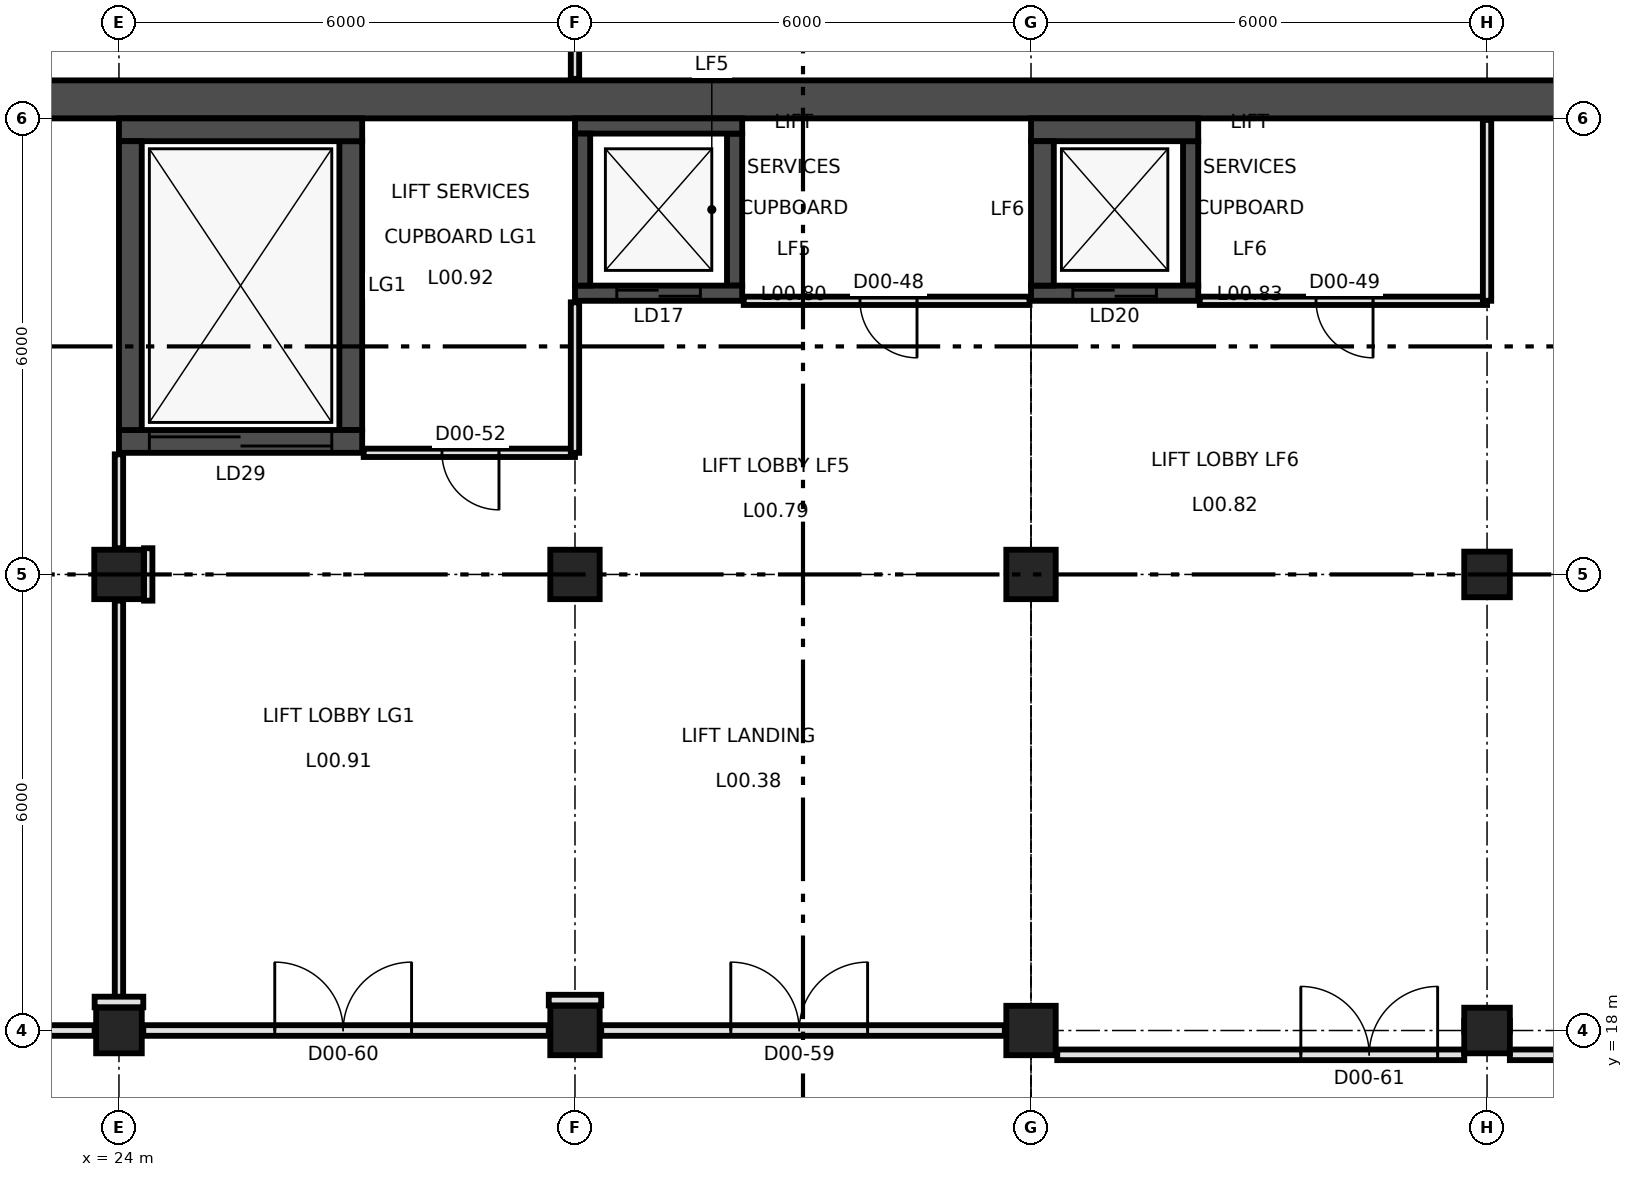
"""IFC4 building model, lengths in metres.
Left out: names, types, materials, properties, quantities, classifications, styles, units other than length and angle.
Written with IfcOpenShell. Run it as: python <this file> out.ifc"""

import sys

from ifc_helpers import new_model, si_unit, direction, frame, frame_2d, origin, origin_2d, place, context, subcontext, project, spatial, rectangle, extrude, element, fill, save


model = new_model("IFC4")
c1 = context("Model", 3, precision=1e-05, world=origin(), true_north=direction((0.0, 1.0)))
c2 = subcontext(c1, "Body", "Model", "MODEL_VIEW")
j1 = project(units=[si_unit("LENGTHUNIT", "METRE"), si_unit("PLANEANGLEUNIT", "RADIAN")], contexts=[c1])
p1 = place(None, origin())
s1 = spatial("IfcSite", under=j1, at=p1, CompositionType="ELEMENT")
p2 = place(p1, origin())
s2 = spatial("IfcBuilding", under=s1, at=p2, CompositionType="ELEMENT")
p3 = place(p2, origin())
s3 = spatial("IfcBuildingStorey", under=s2, at=p3, CompositionType="ELEMENT", Elevation=0.0)
p4 = place(p3, frame((24.0, 18.0, -0.3), z_axis=(0.0, 0.0, 1.0), x_axis=(1.0, 0.0, 0.0)))
e1 = element("IfcColumn", 1, at=p4, inside=s3, PredefinedType="COLUMN", context=c2, shape_type="SweptSolid", body=[
    extrude(rectangle(XDim=0.6, YDim=0.6, at=origin_2d()), origin(), (0.0, 0.0, 1.0), 7.3),
])
for number, where, z_axis, x_axis in (
    (2, (30.0, 18.0, -0.3), (0.0, 0.0, 1.0), (1.0, 0.0, 0.0)),
    (3, (36.0, 18.0, -0.3), (0.0, 0.0, 1.0), (1.0, 0.0, 0.0)),
):
    element("IfcColumn", number, at=place(p3, frame(where, z_axis=z_axis, x_axis=x_axis)), inside=s3, PredefinedType="COLUMN", context=c2, shape_type="SweptSolid", body=[
        extrude(rectangle(XDim=0.65, YDim=0.65, at=origin_2d()), origin(), (0.0, 0.0, 1.0), 7.3),
    ])
p5 = place(p3, frame((42.0, 18.0, -0.3), z_axis=(0.0, 0.0, 1.0), x_axis=(1.0, 0.0, 0.0)))
e4 = element("IfcColumn", 4, at=p5, inside=s3, PredefinedType="COLUMN", context=c2, shape_type="SweptSolid", body=[
    extrude(rectangle(XDim=0.6, YDim=0.6, at=origin_2d()), origin(), (0.0, 0.0, 1.0), 7.3),
])
for number, where, z_axis, x_axis in (
    (5, (24.0, 24.0, -0.3), (0.0, 0.0, 1.0), (1.0, 0.0, 0.0)),
    (6, (30.0, 24.0, -0.3), (0.0, 0.0, 1.0), (1.0, 0.0, 0.0)),
    (7, (36.0, 24.0, -0.3), (0.0, 0.0, 1.0), (1.0, 0.0, 0.0)),
):
    element("IfcColumn", number, at=place(p3, frame(where, z_axis=z_axis, x_axis=x_axis)), inside=s3, PredefinedType="COLUMN", context=c2, shape_type="SweptSolid", body=[
        extrude(rectangle(XDim=0.65, YDim=0.65, at=origin_2d()), origin(), (0.0, 0.0, 1.0), 7.3),
    ])
p6 = place(p3, frame((42.0, 24.0, -0.3), z_axis=(0.0, 0.0, 1.0), x_axis=(1.0, 0.0, 0.0)))
e8 = element("IfcColumn", 8, at=p6, inside=s3, PredefinedType="COLUMN", context=c2, shape_type="SweptSolid", body=[
    extrude(rectangle(XDim=0.6, YDim=0.6, at=origin_2d()), origin(), (0.0, 0.0, 1.0), 7.3),
])
p7 = place(p3, frame((30.0, 29.9, -1.4), z_axis=(0.0, 0.0, 1.0), x_axis=(1.0, 0.0, 0.0)))
e9 = element("IfcWall", 9, at=p7, inside=s3, PredefinedType="SHEAR", context=c2, shape_type="SweptSolid", body=[
    extrude(rectangle(XDim=2.2, YDim=0.2, at=frame_2d((1.1, 0.0))), origin(), (0.0, 0.0, 1.0), 8.4),
])
p8 = place(p3, frame((30.0, 27.7, -1.4), z_axis=(0.0, 0.0, 1.0), x_axis=(1.0, 0.0, 0.0)))
e10 = element("IfcWall", 10, at=p8, inside=s3, PredefinedType="SHEAR", context=c2, shape_type="SweptSolid", body=[
    extrude(rectangle(XDim=2.2, YDim=0.2, at=frame_2d((1.1, 0.0))), origin(), (0.0, 0.0, 1.0), 8.4),
])
p9 = place(p8, frame((0.55, 0.0, 1.4)))
e11 = element("IfcOpeningElement", 11, at=p9, cuts=e10, PredefinedType="OPENING", context=c2, shape_type="SweptSolid", body=[
    extrude(rectangle(XDim=1.1, YDim=2.1, at=frame_2d((0.55, 1.05))), frame((0.0, 0.11, 0.0), z_axis=(0.0, -1.0, 0.0), x_axis=(1.0, 0.0, 0.0)), (0.0, 0.0, 1.0), 0.22),
])
for number, where, z_axis, x_axis in (
    (12, (30.1, 27.8, -1.4), (0.0, 0.0, 1.0), (0.0, 1.0, 0.0)),
    (13, (32.1, 27.8, -1.4), (0.0, 0.0, 1.0), (0.0, 1.0, 0.0)),
):
    element("IfcWall", number, at=place(p3, frame(where, z_axis=z_axis, x_axis=x_axis)), inside=s3, PredefinedType="SHEAR", context=c2, shape_type="SweptSolid", body=[
        extrude(rectangle(XDim=2.0, YDim=0.2, at=frame_2d((1.0, 0.0))), origin(), (0.0, 0.0, 1.0), 8.4),
    ])
p10 = place(p3, frame((36.0, 29.85, -1.4), z_axis=(0.0, 0.0, 1.0), x_axis=(1.0, 0.0, 0.0)))
e14 = element("IfcWall", 14, at=p10, inside=s3, PredefinedType="SHEAR", context=c2, shape_type="SweptSolid", body=[
    extrude(rectangle(XDim=2.2, YDim=0.3, at=frame_2d((1.1, 0.0))), origin(), (0.0, 0.0, 1.0), 8.4),
])
p11 = place(p3, frame((36.0, 27.7, -1.4), z_axis=(0.0, 0.0, 1.0), x_axis=(1.0, 0.0, 0.0)))
e15 = element("IfcWall", 15, at=p11, inside=s3, PredefinedType="SHEAR", context=c2, shape_type="SweptSolid", body=[
    extrude(rectangle(XDim=2.2, YDim=0.2, at=frame_2d((1.1, 0.0))), origin(), (0.0, 0.0, 1.0), 8.4),
])
p12 = place(p11, frame((0.55, 0.0, 1.4)))
e16 = element("IfcOpeningElement", 16, at=p12, cuts=e15, PredefinedType="OPENING", context=c2, shape_type="SweptSolid", body=[
    extrude(rectangle(XDim=1.1, YDim=2.1, at=frame_2d((0.55, 1.05))), frame((0.0, 0.11, 0.0), z_axis=(0.0, -1.0, 0.0), x_axis=(1.0, 0.0, 0.0)), (0.0, 0.0, 1.0), 0.22),
])
p13 = place(p3, frame((36.15, 27.8, -1.4), z_axis=(0.0, 0.0, 1.0), x_axis=(0.0, 1.0, 0.0)))
e17 = element("IfcWall", 17, at=p13, inside=s3, PredefinedType="SHEAR", context=c2, shape_type="SweptSolid", body=[
    extrude(rectangle(XDim=1.9, YDim=0.3, at=frame_2d((0.95, 0.0))), origin(), (0.0, 0.0, 1.0), 8.4),
])
p14 = place(p3, frame((38.1, 27.8, -1.4), z_axis=(0.0, 0.0, 1.0), x_axis=(0.0, 1.0, 0.0)))
e18 = element("IfcWall", 18, at=p14, inside=s3, PredefinedType="SHEAR", context=c2, shape_type="SweptSolid", body=[
    extrude(rectangle(XDim=1.9, YDim=0.2, at=frame_2d((0.95, 0.0))), origin(), (0.0, 0.0, 1.0), 8.4),
])
p15 = place(p3, frame((24.0, 29.85, -1.4), z_axis=(0.0, 0.0, 1.0), x_axis=(1.0, 0.0, 0.0)))
e19 = element("IfcWall", 19, at=p15, inside=s3, PredefinedType="SHEAR", context=c2, shape_type="SweptSolid", body=[
    extrude(rectangle(XDim=3.2, YDim=0.3, at=frame_2d((1.6, 0.0))), origin(), (0.0, 0.0, 1.0), 8.4),
])
p16 = place(p3, frame((24.0, 25.75, -1.4), z_axis=(0.0, 0.0, 1.0), x_axis=(1.0, 0.0, 0.0)))
e20 = element("IfcWall", 20, at=p16, inside=s3, PredefinedType="SHEAR", context=c2, shape_type="SweptSolid", body=[
    extrude(rectangle(XDim=3.2, YDim=0.3, at=frame_2d((1.6, 0.0))), origin(), (0.0, 0.0, 1.0), 8.4),
])
p17 = place(p16, frame((0.4, 0.0, 1.4)))
e21 = element("IfcOpeningElement", 21, at=p17, cuts=e20, PredefinedType="OPENING", context=c2, shape_type="SweptSolid", body=[
    extrude(rectangle(XDim=2.4, YDim=2.4, at=frame_2d((1.2, 1.2))), frame((0.0, 0.16, 0.0), z_axis=(0.0, -1.0, 0.0), x_axis=(1.0, 0.0, 0.0)), (0.0, 0.0, 1.0), 0.32),
])
for number, where, z_axis, x_axis in (
    (22, (24.15, 25.9, -1.4), (0.0, 0.0, 1.0), (0.0, 1.0, 0.0)),
    (23, (27.05, 25.9, -1.4), (0.0, 0.0, 1.0), (0.0, 1.0, 0.0)),
):
    element("IfcWall", number, at=place(p3, frame(where, z_axis=z_axis, x_axis=x_axis)), inside=s3, PredefinedType="SHEAR", context=c2, shape_type="SweptSolid", body=[
        extrude(rectangle(XDim=3.8, YDim=0.3, at=frame_2d((1.9, 0.0))), origin(), (0.0, 0.0, 1.0), 8.4),
    ])
p18 = place(p3, frame((18.5, 30.25, -0.3), z_axis=(0.0, 0.0, 1.0), x_axis=(1.0, 0.0, 0.0)))
e24 = element("IfcWall", 24, at=p18, inside=s3, PredefinedType="SHEAR", context=c2, shape_type="SweptSolid", body=[
    extrude(rectangle(XDim=29.0, YDim=0.5, at=frame_2d((14.5, 0.0))), origin(), (0.0, 0.0, 1.0), 7.3),
])
p19 = place(p3, frame((30.0, 30.52, 0.0), z_axis=(0.0, 0.0, 1.0), x_axis=(0.0, 1.0, 0.0)))
e25 = element("IfcWall", 25, at=p19, inside=s3, PredefinedType="PARTITIONING", context=c2, shape_type="SweptSolid", body=[
    extrude(rectangle(XDim=3.11, YDim=0.11, at=frame_2d((1.555, 0.0))), origin(), (0.0, 0.0, 1.0), 6.7),
])
p20 = place(p3, frame((24.0, 24.345, 0.0), z_axis=(0.0, 0.0, 1.0), x_axis=(0.0, 1.0, 0.0)))
e26 = element("IfcWall", 26, at=p20, inside=s3, PredefinedType="PARTITIONING", context=c2, shape_type="SweptSolid", body=[
    extrude(rectangle(XDim=1.235, YDim=0.11, at=frame_2d((0.618, 0.0))), origin(), (0.0, 0.0, 1.0), 6.05),
])
p21 = place(p3, frame((24.0, 18.32, 0.0), z_axis=(0.0, 0.0, 1.0), x_axis=(0.0, 1.0, 0.0)))
e27 = element("IfcWall", 27, at=p21, inside=s3, PredefinedType="PARTITIONING", context=c2, shape_type="SweptSolid", body=[
    extrude(rectangle(XDim=5.335, YDim=0.11, at=frame_2d((2.667, 0.0))), origin(), (0.0, 0.0, 1.0), 6.05),
])
p22 = place(p3, frame((24.385, 23.655, 0.0), z_axis=(0.0, 0.0, 1.0), x_axis=(0.0, 1.0, 0.0)))
e28 = element("IfcWall", 28, at=p22, inside=s3, PredefinedType="PARTITIONING", context=c2, shape_type="SweptSolid", body=[
    extrude(rectangle(XDim=0.69, YDim=0.11, at=frame_2d((0.345, 0.0))), origin(), (0.0, 0.0, 1.0), 6.05),
])
p23 = place(p3, frame((27.22, 25.6, 0.0), z_axis=(0.0, 0.0, 1.0), x_axis=(1.0, 0.0, 0.0)))
e29 = element("IfcWall", 29, at=p23, inside=s3, PredefinedType="PARTITIONING", context=c2, shape_type="SweptSolid", body=[
    extrude(rectangle(XDim=2.78, YDim=0.11, at=frame_2d((1.39, 0.0))), origin(), (0.0, 0.0, 1.0), 6.05),
])
p24 = place(p23, frame((1.03, 0.0, 0.0)))
e30 = element("IfcOpeningElement", 30, at=p24, cuts=e29, PredefinedType="OPENING", context=c2, shape_type="SweptSolid", body=[
    extrude(rectangle(XDim=0.75, YDim=2.04, at=frame_2d((0.375, 1.02))), frame((0.0, 0.065, 0.0), z_axis=(0.0, -1.0, 0.0), x_axis=(1.0, 0.0, 0.0)), (0.0, 0.0, 1.0), 0.13),
])
p25 = place(p3, frame((30.0, 25.6, 0.0), z_axis=(0.0, 0.0, 1.0), x_axis=(0.0, 1.0, 0.0)))
e31 = element("IfcWall", 31, at=p25, inside=s3, PredefinedType="PARTITIONING", context=c2, shape_type="SweptSolid", body=[
    extrude(rectangle(XDim=1.98, YDim=0.11, at=frame_2d((0.99, 0.0))), origin(), (0.0, 0.0, 1.0), 6.05),
])
p26 = place(p3, frame((32.22, 27.6, 0.0), z_axis=(0.0, 0.0, 1.0), x_axis=(1.0, 0.0, 0.0)))
e32 = element("IfcWall", 32, at=p26, inside=s3, PredefinedType="PARTITIONING", context=c2, shape_type="SweptSolid", body=[
    extrude(rectangle(XDim=3.76, YDim=0.11, at=frame_2d((1.88, 0.0))), origin(), (0.0, 0.0, 1.0), 6.15),
])
p27 = place(p26, frame((1.53, 0.0, 0.0)))
e33 = element("IfcOpeningElement", 33, at=p27, cuts=e32, PredefinedType="OPENING", context=c2, shape_type="SweptSolid", body=[
    extrude(rectangle(XDim=0.75, YDim=2.04, at=frame_2d((0.375, 1.02))), frame((0.0, 0.065, 0.0), z_axis=(0.0, -1.0, 0.0), x_axis=(1.0, 0.0, 0.0)), (0.0, 0.0, 1.0), 0.13),
])
p28 = place(p3, frame((38.22, 27.6, 0.0), z_axis=(0.0, 0.0, 1.0), x_axis=(1.0, 0.0, 0.0)))
e34 = element("IfcWall", 34, at=p28, inside=s3, PredefinedType="PARTITIONING", context=c2, shape_type="SweptSolid", body=[
    extrude(rectangle(XDim=3.78, YDim=0.11, at=frame_2d((1.89, 0.0))), origin(), (0.0, 0.0, 1.0), 6.15),
])
p29 = place(p28, frame((1.53, 0.0, 0.0)))
e35 = element("IfcOpeningElement", 35, at=p29, cuts=e34, PredefinedType="OPENING", context=c2, shape_type="SweptSolid", body=[
    extrude(rectangle(XDim=0.75, YDim=2.04, at=frame_2d((0.375, 1.02))), frame((0.0, 0.065, 0.0), z_axis=(0.0, -1.0, 0.0), x_axis=(1.0, 0.0, 0.0)), (0.0, 0.0, 1.0), 0.13),
])
p30 = place(p3, frame((42.0, 27.6, 0.0), z_axis=(0.0, 0.0, 1.0), x_axis=(0.0, 1.0, 0.0)))
e36 = element("IfcWall", 36, at=p30, inside=s3, PredefinedType="PARTITIONING", context=c2, shape_type="SweptSolid", body=[
    extrude(rectangle(XDim=2.38, YDim=0.11, at=frame_2d((1.19, 0.0))), origin(), (0.0, 0.0, 1.0), 6.15),
])
p31 = place(p3, frame((18.32, 18.0, 0.0), z_axis=(0.0, 0.0, 1.0), x_axis=(1.0, 0.0, 0.0)))
e37 = element("IfcWall", 37, at=p31, inside=s3, PredefinedType="PARTITIONING", context=c2, shape_type="SweptSolid", body=[
    extrude(rectangle(XDim=5.36, YDim=0.14, at=frame_2d((2.68, 0.0))), origin(), (0.0, 0.0, 1.0), 6.05),
])
p32 = place(p3, frame((24.32, 18.0, 0.0), z_axis=(0.0, 0.0, 1.0), x_axis=(1.0, 0.0, 0.0)))
e38 = element("IfcWall", 38, at=p32, inside=s3, PredefinedType="PARTITIONING", context=c2, shape_type="SweptSolid", body=[
    extrude(rectangle(XDim=5.335, YDim=0.14, at=frame_2d((2.667, 0.0))), origin(), (0.0, 0.0, 1.0), 6.05),
])
p33 = place(p32, frame((1.73, 0.0, 0.0)))
e39 = element("IfcOpeningElement", 39, at=p33, cuts=e38, PredefinedType="OPENING", context=c2, shape_type="SweptSolid", body=[
    extrude(rectangle(XDim=1.8, YDim=2.1, at=frame_2d((0.9, 1.05))), frame((0.0, 0.08, 0.0), z_axis=(0.0, -1.0, 0.0), x_axis=(1.0, 0.0, 0.0)), (0.0, 0.0, 1.0), 0.16),
])
p34 = place(p3, frame((30.345, 18.0, 0.0), z_axis=(0.0, 0.0, 1.0), x_axis=(1.0, 0.0, 0.0)))
e40 = element("IfcWall", 40, at=p34, inside=s3, PredefinedType="PARTITIONING", context=c2, shape_type="SweptSolid", body=[
    extrude(rectangle(XDim=5.31, YDim=0.14, at=frame_2d((2.655, 0.0))), origin(), (0.0, 0.0, 1.0), 6.05),
])
p35 = place(p34, frame((1.705, 0.0, 0.0)))
e41 = element("IfcOpeningElement", 41, at=p35, cuts=e40, PredefinedType="OPENING", context=c2, shape_type="SweptSolid", body=[
    extrude(rectangle(XDim=1.8, YDim=2.1, at=frame_2d((0.9, 1.05))), frame((0.0, 0.08, 0.0), z_axis=(0.0, -1.0, 0.0), x_axis=(1.0, 0.0, 0.0)), (0.0, 0.0, 1.0), 0.16),
])
p36 = place(p3, frame((23.68, 18.375, 0.0), z_axis=(0.0, 0.0, 1.0), x_axis=(1.0, 0.0, 0.0)))
e42 = element("IfcWall", 42, at=p36, inside=s3, PredefinedType="PARTITIONING", context=c2, shape_type="SweptSolid", body=[
    extrude(rectangle(XDim=0.64, YDim=0.14, at=frame_2d((0.32, 0.0))), origin(), (0.0, 0.0, 1.0), 6.05),
])
p37 = place(p3, frame((29.655, 18.4, 0.0), z_axis=(0.0, 0.0, 1.0), x_axis=(1.0, 0.0, 0.0)))
e43 = element("IfcWall", 43, at=p37, inside=s3, PredefinedType="PARTITIONING", context=c2, shape_type="SweptSolid", body=[
    extrude(rectangle(XDim=0.69, YDim=0.14, at=frame_2d((0.345, 0.0))), origin(), (0.0, 0.0, 1.0), 6.05),
])
p38 = place(p3, frame((36.345, 17.68, 0.0), z_axis=(0.0, 0.0, 1.0), x_axis=(1.0, 0.0, 0.0)))
e44 = element("IfcWall", 44, at=p38, inside=s3, PredefinedType="PARTITIONING", context=c2, shape_type="SweptSolid", body=[
    extrude(rectangle(XDim=5.355, YDim=0.14, at=frame_2d((2.677, 0.0))), origin(), (0.0, 0.0, 1.0), 6.3),
])
p39 = place(p38, frame((3.205, 0.0, 0.0)))
e45 = element("IfcOpeningElement", 45, at=p39, cuts=e44, PredefinedType="OPENING", context=c2, shape_type="SweptSolid", body=[
    extrude(rectangle(XDim=1.8, YDim=2.1, at=frame_2d((0.9, 1.05))), frame((0.0, 0.08, 0.0), z_axis=(0.0, -1.0, 0.0), x_axis=(1.0, 0.0, 0.0)), (0.0, 0.0, 1.0), 0.16),
])
p40 = place(p3, frame((42.3, 17.68, 0.0), z_axis=(0.0, 0.0, 1.0), x_axis=(1.0, 0.0, 0.0)))
e46 = element("IfcWall", 46, at=p40, inside=s3, PredefinedType="PARTITIONING", context=c2, shape_type="SweptSolid", body=[
    extrude(rectangle(XDim=11.7, YDim=0.14, at=frame_2d((5.85, 0.0))), origin(), (0.0, 0.0, 1.0), 2.75),
])
p41 = place(p40, frame((6.25, 0.0, 0.0)))
e47 = element("IfcOpeningElement", 47, at=p41, cuts=e46, PredefinedType="OPENING", context=c2, shape_type="SweptSolid", body=[
    extrude(rectangle(XDim=1.8, YDim=2.1, at=frame_2d((0.9, 1.05))), frame((0.0, 0.08, 0.0), z_axis=(0.0, -1.0, 0.0), x_axis=(1.0, 0.0, 0.0)), (0.0, 0.0, 1.0), 0.16),
])
p42 = place(p3, frame((41.7, 18.055, 0.0), z_axis=(0.0, 0.0, 1.0), x_axis=(1.0, 0.0, 0.0)))
e48 = element("IfcWall", 48, at=p42, inside=s3, PredefinedType="PARTITIONING", context=c2, shape_type="SweptSolid", body=[
    extrude(rectangle(XDim=0.6, YDim=0.14, at=frame_2d((0.3, 0.0))), origin(), (0.0, 0.0, 1.0), 2.75),
])
p43 = place(p27, origin())
e49 = element("IfcDoor", 49, at=p43, inside=s3, OperationType="SINGLE_SWING_RIGHT", PredefinedType="DOOR", context=c2, shape_type="SweptSolid", body=[
    extrude(rectangle(XDim=0.75, YDim=2.04, at=frame_2d((0.375, 1.02))), frame((0.0, 0.025, 0.0), z_axis=(0.0, -1.0, 0.0), x_axis=(1.0, 0.0, 0.0)), (0.0, 0.0, 1.0), 0.05),
])
fill(e33, e49)
p44 = place(p29, origin())
e50 = element("IfcDoor", 50, at=p44, inside=s3, OperationType="SINGLE_SWING_RIGHT", PredefinedType="DOOR", context=c2, shape_type="SweptSolid", body=[
    extrude(rectangle(XDim=0.75, YDim=2.04, at=frame_2d((0.375, 1.02))), frame((0.0, 0.025, 0.0), z_axis=(0.0, -1.0, 0.0), x_axis=(1.0, 0.0, 0.0)), (0.0, 0.0, 1.0), 0.05),
])
fill(e35, e50)
p45 = place(p24, origin())
e51 = element("IfcDoor", 51, at=p45, inside=s3, OperationType="SINGLE_SWING_RIGHT", PredefinedType="DOOR", context=c2, shape_type="SweptSolid", body=[
    extrude(rectangle(XDim=0.75, YDim=2.04, at=frame_2d((0.375, 1.02))), frame((0.0, 0.025, 0.0), z_axis=(0.0, -1.0, 0.0), x_axis=(1.0, 0.0, 0.0)), (0.0, 0.0, 1.0), 0.05),
])
fill(e30, e51)
p46 = place(p35, origin())
e52 = element("IfcDoor", 52, at=p46, inside=s3, OperationType="DOUBLE_DOOR_SINGLE_SWING", PredefinedType="DOOR", context=c2, shape_type="SweptSolid", body=[
    extrude(rectangle(XDim=1.8, YDim=2.1, at=frame_2d((0.9, 1.05))), frame((0.0, 0.025, 0.0), z_axis=(0.0, -1.0, 0.0), x_axis=(1.0, 0.0, 0.0)), (0.0, 0.0, 1.0), 0.05),
])
fill(e41, e52)
p47 = place(p33, origin())
e53 = element("IfcDoor", 53, at=p47, inside=s3, OperationType="DOUBLE_DOOR_SINGLE_SWING", PredefinedType="DOOR", context=c2, shape_type="SweptSolid", body=[
    extrude(rectangle(XDim=1.8, YDim=2.1, at=frame_2d((0.9, 1.05))), frame((0.0, 0.025, 0.0), z_axis=(0.0, -1.0, 0.0), x_axis=(1.0, 0.0, 0.0)), (0.0, 0.0, 1.0), 0.05),
])
fill(e39, e53)
p48 = place(p39, origin())
e54 = element("IfcDoor", 54, at=p48, inside=s3, OperationType="DOUBLE_DOOR_SINGLE_SWING", PredefinedType="DOOR", context=c2, shape_type="SweptSolid", body=[
    extrude(rectangle(XDim=1.8, YDim=2.1, at=frame_2d((0.9, 1.05))), frame((0.0, 0.025, 0.0), z_axis=(0.0, -1.0, 0.0), x_axis=(1.0, 0.0, 0.0)), (0.0, 0.0, 1.0), 0.05),
])
fill(e45, e54)
p49 = place(p9, origin())
e55 = element("IfcDoor", 55, at=p49, inside=s3, OperationType="DOUBLE_DOOR_SLIDING", PredefinedType="DOOR", context=c2, shape_type="SweptSolid", body=[
    extrude(rectangle(XDim=1.1, YDim=2.1, at=frame_2d((0.55, 1.05))), frame((0.0, 0.025, 0.0), z_axis=(0.0, -1.0, 0.0), x_axis=(1.0, 0.0, 0.0)), (0.0, 0.0, 1.0), 0.05),
])
fill(e11, e55)
p50 = place(p12, origin())
e56 = element("IfcDoor", 56, at=p50, inside=s3, OperationType="DOUBLE_DOOR_SLIDING", PredefinedType="DOOR", context=c2, shape_type="SweptSolid", body=[
    extrude(rectangle(XDim=1.1, YDim=2.1, at=frame_2d((0.55, 1.05))), frame((0.0, 0.025, 0.0), z_axis=(0.0, -1.0, 0.0), x_axis=(1.0, 0.0, 0.0)), (0.0, 0.0, 1.0), 0.05),
])
fill(e16, e56)
p51 = place(p17, origin())
e57 = element("IfcDoor", 57, at=p51, inside=s3, OperationType="DOUBLE_DOOR_SLIDING", PredefinedType="DOOR", context=c2, shape_type="SweptSolid", body=[
    extrude(rectangle(XDim=2.4, YDim=2.4, at=frame_2d((1.2, 1.2))), frame((0.0, 0.025, 0.0), z_axis=(0.0, -1.0, 0.0), x_axis=(1.0, 0.0, 0.0)), (0.0, 0.0, 1.0), 0.05),
])
fill(e21, e57)
save(model, sys.argv[1])
